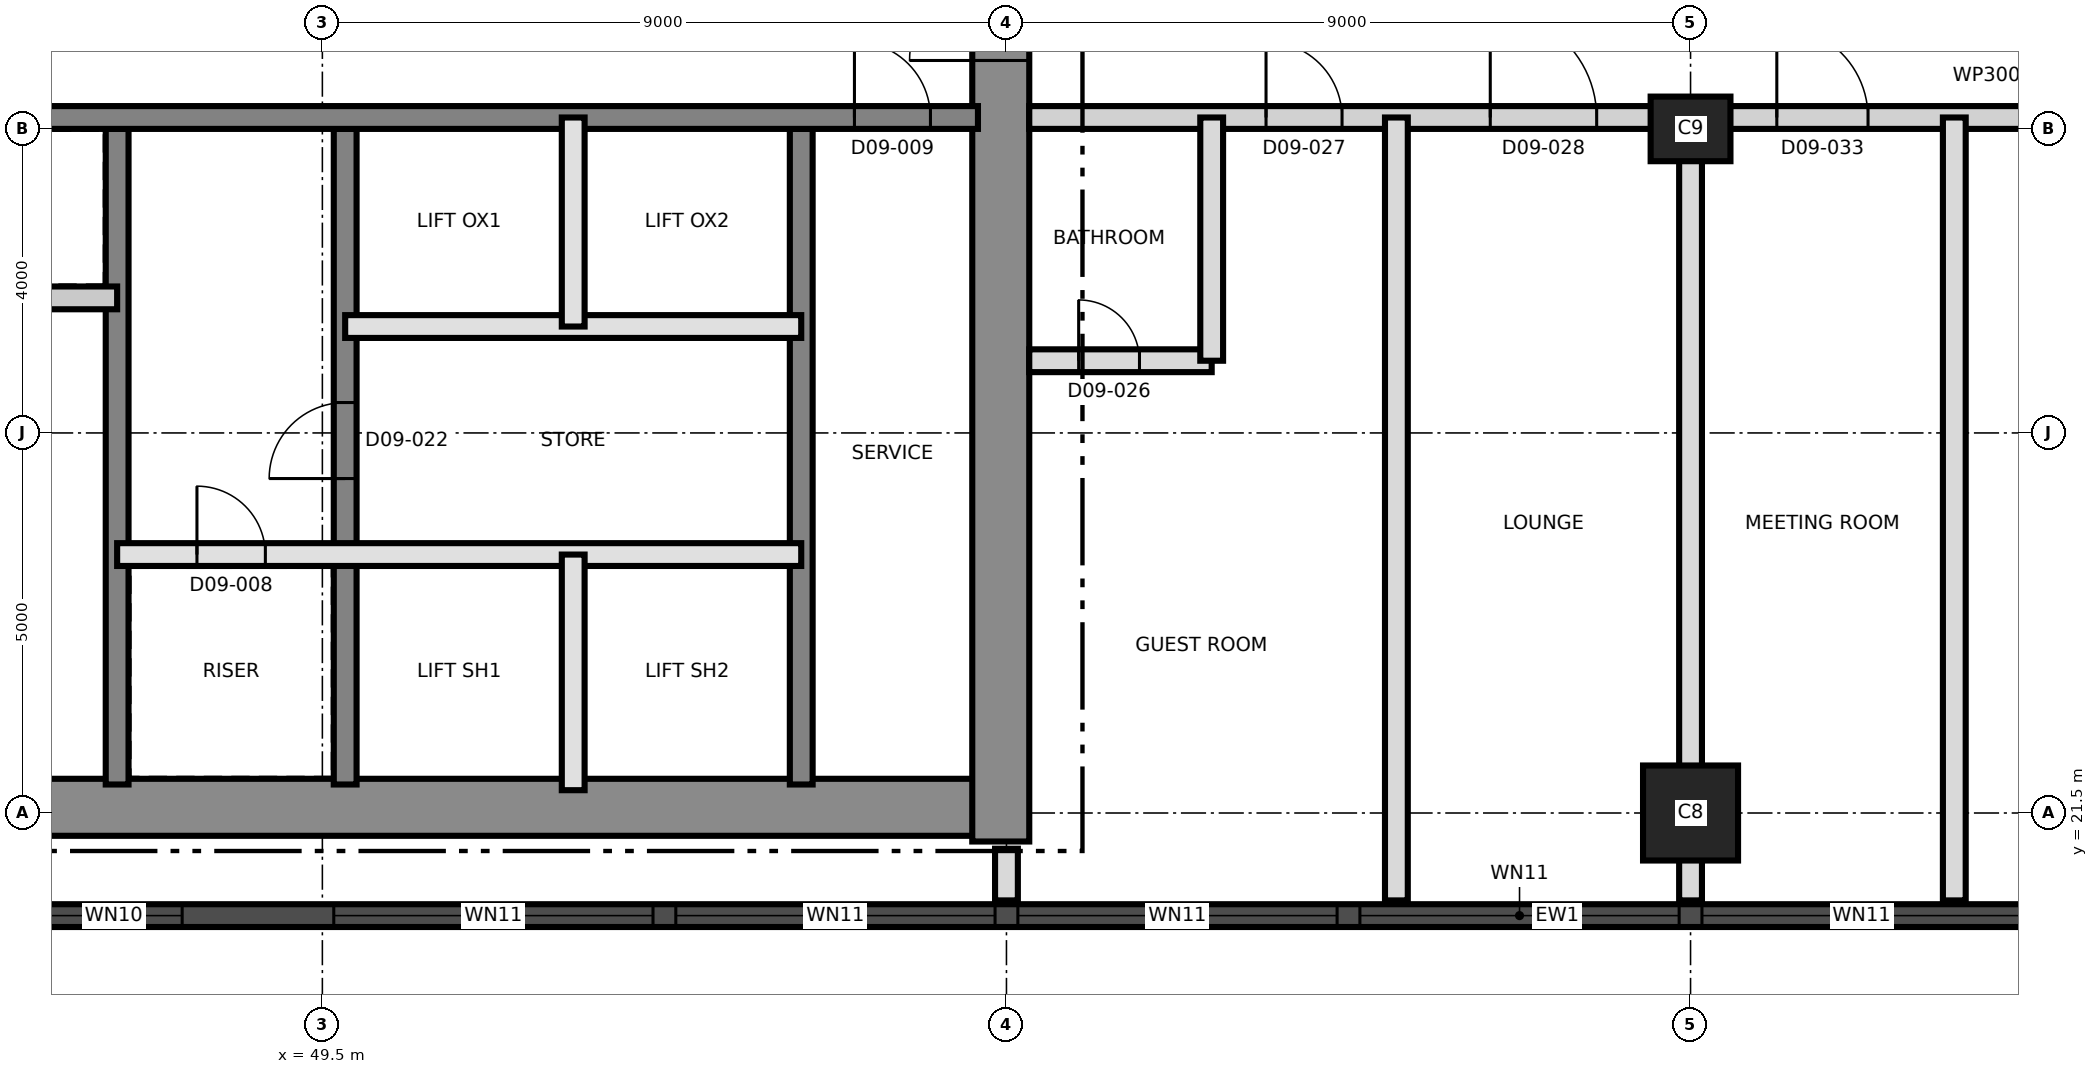
"""IFC4 building model, lengths in metres.
Left out: names, types, materials, properties, quantities, classifications, styles, units other than length and angle.
Written with IfcOpenShell. Run it as: python <this file> out.ifc"""

import sys

from ifc_helpers import new_model, si_unit, direction, frame, frame_2d, origin, origin_2d, place, context, subcontext, project, spatial, rectangle, extrude, element, fill, save


model = new_model("IFC4")
c1 = context("Model", 3, precision=1e-05, world=origin(), true_north=direction((0.0, 1.0)))
c2 = subcontext(c1, "Body", "Model", "MODEL_VIEW")
j1 = project(units=[si_unit("LENGTHUNIT", "METRE"), si_unit("PLANEANGLEUNIT", "RADIAN")], contexts=[c1])
p1 = place(None, origin())
s1 = spatial("IfcSite", under=j1, at=p1, CompositionType="ELEMENT")
p2 = place(p1, origin())
s2 = spatial("IfcBuilding", under=s1, at=p2, CompositionType="ELEMENT")
p3 = place(p2, frame((0.0, 0.0, 113.0)))
s3 = spatial("IfcBuildingStorey", under=s2, at=p3, CompositionType="ELEMENT", Elevation=113.0)
p4 = place(p3, frame((31.125, 21.575, 0.0), z_axis=(0.0, 0.0, 1.0), x_axis=(1.0, 0.0, 0.0)))
e1 = element("IfcWall", 1, at=p4, inside=s3, PredefinedType="SHEAR", context=c2, shape_type="SweptSolid", body=[
    extrude(rectangle(XDim=27.0, YDim=0.75, at=frame_2d((13.5, 0.0))), origin(), (0.0, 0.0, 1.0), 3.7),
])
p5 = place(p3, frame((58.425, 21.125, 0.0), z_axis=(0.0, 0.0, 1.0), x_axis=(0.0, 1.0, 0.0)))
e2 = element("IfcWall", 2, at=p5, inside=s3, PredefinedType="SHEAR", context=c2, shape_type="SweptSolid", body=[
    extrude(rectangle(XDim=18.75, YDim=0.75, at=frame_2d((9.375, 0.0))), origin(), (0.0, 0.0, 1.0), 3.7),
])
p6 = place(p5, frame((10.275, 0.0, 0.0)))
e3 = element("IfcOpeningElement", 3, at=p6, cuts=e2, PredefinedType="OPENING", context=c2, shape_type="SweptSolid", body=[
    extrude(rectangle(XDim=1.2, YDim=2.1, at=frame_2d((0.6, 1.05))), frame((0.0, 0.385, 0.0), z_axis=(0.0, -1.0, 0.0), x_axis=(1.0, 0.0, 0.0)), (0.0, 0.0, 1.0), 0.77),
])
p7 = place(p3, frame((46.8, 21.875, 0.0), z_axis=(0.0, 0.0, 1.0), x_axis=(0.0, 1.0, 0.0)))
e4 = element("IfcWall", 4, at=p7, inside=s3, PredefinedType="SHEAR", context=c2, shape_type="SweptSolid", body=[
    extrude(rectangle(XDim=8.625, YDim=0.3, at=frame_2d((4.312, 0.0))), origin(), (0.0, 0.0, 1.0), 3.7),
])
p8 = place(p3, frame((49.8, 21.875, 0.0), z_axis=(0.0, 0.0, 1.0), x_axis=(0.0, 1.0, 0.0)))
e5 = element("IfcWall", 5, at=p8, inside=s3, PredefinedType="SHEAR", context=c2, shape_type="SweptSolid", body=[
    extrude(rectangle(XDim=8.625, YDim=0.3, at=frame_2d((4.312, 0.0))), origin(), (0.0, 0.0, 1.0), 3.7),
])
p9 = place(p8, frame((4.025, 0.0, 0.0)))
e6 = element("IfcOpeningElement", 6, at=p9, cuts=e5, PredefinedType="OPENING", context=c2, shape_type="SweptSolid", body=[
    extrude(rectangle(XDim=1.0, YDim=2.1, at=frame_2d((0.5, 1.05))), frame((0.0, 0.16, 0.0), z_axis=(0.0, -1.0, 0.0), x_axis=(1.0, 0.0, 0.0)), (0.0, 0.0, 1.0), 0.32),
])
p10 = place(p3, frame((55.8, 21.875, 0.0), z_axis=(0.0, 0.0, 1.0), x_axis=(0.0, 1.0, 0.0)))
e7 = element("IfcWall", 7, at=p10, inside=s3, PredefinedType="SHEAR", context=c2, shape_type="SweptSolid", body=[
    extrude(rectangle(XDim=8.625, YDim=0.3, at=frame_2d((4.312, 0.0))), origin(), (0.0, 0.0, 1.0), 3.7),
])
p11 = place(p3, frame((31.875, 30.65, 0.0), z_axis=(0.0, 0.0, 1.0), x_axis=(1.0, 0.0, 0.0)))
e8 = element("IfcWall", 8, at=p11, inside=s3, PredefinedType="SHEAR", context=c2, shape_type="SweptSolid", body=[
    extrude(rectangle(XDim=26.25, YDim=0.3, at=frame_2d((13.125, 0.0))), origin(), (0.0, 0.0, 1.0), 3.7),
])
p12 = place(p11, frame((24.625, 0.0, 0.0)))
e9 = element("IfcOpeningElement", 9, at=p12, cuts=e8, PredefinedType="OPENING", context=c2, shape_type="SweptSolid", body=[
    extrude(rectangle(XDim=1.0, YDim=2.1, at=frame_2d((0.5, 1.05))), frame((0.0, 0.16, 0.0), z_axis=(0.0, -1.0, 0.0), x_axis=(1.0, 0.0, 0.0)), (0.0, 0.0, 1.0), 0.32),
])
p13 = place(p11, frame((11.425, 0.0, 0.0)))
e10 = element("IfcOpeningElement", 10, at=p13, cuts=e8, PredefinedType="OPENING", context=c2, shape_type="SweptSolid", body=[
    extrude(rectangle(XDim=1.0, YDim=2.1, at=frame_2d((0.5, 1.05))), frame((0.0, 0.16, 0.0), z_axis=(0.0, -1.0, 0.0), x_axis=(1.0, 0.0, 0.0)), (0.0, 0.0, 1.0), 0.32),
])
p14 = place(p3, frame((67.5, 21.5, 0.0), z_axis=(0.0, 0.0, 1.0), x_axis=(1.0, 0.0, 0.0)))
e11 = element("IfcColumn", 11, at=p14, inside=s3, PredefinedType="COLUMN", context=c2, shape_type="SweptSolid", body=[
    extrude(rectangle(XDim=1.25, YDim=1.25, at=origin_2d()), origin(), (0.0, 0.0, 1.0), 3.7),
])
p15 = place(p3, frame((67.5, 30.5, 0.0), z_axis=(0.0, 0.0, 1.0), x_axis=(1.0, 0.0, 0.0)))
e12 = element("IfcColumn", 12, at=p15, inside=s3, PredefinedType="COLUMN", context=c2, shape_type="SweptSolid", body=[
    extrude(rectangle(XDim=1.05, YDim=0.85, at=origin_2d()), origin(), (0.0, 0.0, 1.0), 3.7),
])
p16 = place(p3, frame((44.011, 20.15, 0.0), z_axis=(0.0, 0.0, 1.0), x_axis=(1.0, 0.0, 0.0)))
e13 = element("IfcWall", 13, at=p16, inside=s3, PredefinedType="SOLIDWALL", context=c2, shape_type="SweptSolid", body=[
    extrude(rectangle(XDim=43.476, YDim=0.3, at=frame_2d((21.738, 0.0))), origin(), (0.0, 0.0, 1.0), 3.4),
])
p17 = place(p16, frame((1.845, 0.0, 0.3)))
e14 = element("IfcOpeningElement", 14, at=p17, cuts=e13, PredefinedType="OPENING", context=c2, shape_type="SweptSolid", body=[
    extrude(rectangle(XDim=1.8, YDim=2.4, at=frame_2d((0.9, 1.2))), frame((0.0, 0.16, 0.0), z_axis=(0.0, -1.0, 0.0), x_axis=(1.0, 0.0, 0.0)), (0.0, 0.0, 1.0), 0.32),
])
p18 = place(p16, frame((5.639, 0.0, 0.9)))
e15 = element("IfcOpeningElement", 15, at=p18, cuts=e13, PredefinedType="OPENING", context=c2, shape_type="SweptSolid", body=[
    extrude(rectangle(XDim=4.2, YDim=1.5, at=frame_2d((2.1, 0.75))), frame((0.0, 0.16, 0.0), z_axis=(0.0, -1.0, 0.0), x_axis=(1.0, 0.0, 0.0)), (0.0, 0.0, 1.0), 0.32),
])
p19 = place(p16, frame((10.139, 0.0, 0.9)))
e16 = element("IfcOpeningElement", 16, at=p19, cuts=e13, PredefinedType="OPENING", context=c2, shape_type="SweptSolid", body=[
    extrude(rectangle(XDim=4.2, YDim=1.5, at=frame_2d((2.1, 0.75))), frame((0.0, 0.16, 0.0), z_axis=(0.0, -1.0, 0.0), x_axis=(1.0, 0.0, 0.0)), (0.0, 0.0, 1.0), 0.32),
])
p20 = place(p16, frame((14.639, 0.0, 0.9)))
e17 = element("IfcOpeningElement", 17, at=p20, cuts=e13, PredefinedType="OPENING", context=c2, shape_type="SweptSolid", body=[
    extrude(rectangle(XDim=4.2, YDim=1.5, at=frame_2d((2.1, 0.75))), frame((0.0, 0.16, 0.0), z_axis=(0.0, -1.0, 0.0), x_axis=(1.0, 0.0, 0.0)), (0.0, 0.0, 1.0), 0.32),
])
p21 = place(p16, frame((19.139, 0.0, 0.9)))
e18 = element("IfcOpeningElement", 18, at=p21, cuts=e13, PredefinedType="OPENING", context=c2, shape_type="SweptSolid", body=[
    extrude(rectangle(XDim=4.2, YDim=1.5, at=frame_2d((2.1, 0.75))), frame((0.0, 0.16, 0.0), z_axis=(0.0, -1.0, 0.0), x_axis=(1.0, 0.0, 0.0)), (0.0, 0.0, 1.0), 0.32),
])
p22 = place(p16, frame((23.639, 0.0, 0.9)))
e19 = element("IfcOpeningElement", 19, at=p22, cuts=e13, PredefinedType="OPENING", context=c2, shape_type="SweptSolid", body=[
    extrude(rectangle(XDim=4.2, YDim=1.5, at=frame_2d((2.1, 0.75))), frame((0.0, 0.16, 0.0), z_axis=(0.0, -1.0, 0.0), x_axis=(1.0, 0.0, 0.0)), (0.0, 0.0, 1.0), 0.32),
])
p23 = place(p16, frame((28.139, 0.0, 0.9)))
e20 = element("IfcOpeningElement", 20, at=p23, cuts=e13, PredefinedType="OPENING", context=c2, shape_type="SweptSolid", body=[
    extrude(rectangle(XDim=4.2, YDim=1.5, at=frame_2d((2.1, 0.75))), frame((0.0, 0.16, 0.0), z_axis=(0.0, -1.0, 0.0), x_axis=(1.0, 0.0, 0.0)), (0.0, 0.0, 1.0), 0.32),
])
p24 = place(p16, frame((32.639, 0.0, 0.9)))
e21 = element("IfcOpeningElement", 21, at=p24, cuts=e13, PredefinedType="OPENING", context=c2, shape_type="SweptSolid", body=[
    extrude(rectangle(XDim=4.2, YDim=1.5, at=frame_2d((2.1, 0.75))), frame((0.0, 0.16, 0.0), z_axis=(0.0, -1.0, 0.0), x_axis=(1.0, 0.0, 0.0)), (0.0, 0.0, 1.0), 0.32),
])
p25 = place(p16, frame((37.139, 0.0, 0.9)))
e22 = element("IfcOpeningElement", 22, at=p25, cuts=e13, PredefinedType="OPENING", context=c2, shape_type="SweptSolid", body=[
    extrude(rectangle(XDim=4.2, YDim=1.5, at=frame_2d((2.1, 0.75))), frame((0.0, 0.16, 0.0), z_axis=(0.0, -1.0, 0.0), x_axis=(1.0, 0.0, 0.0)), (0.0, 0.0, 1.0), 0.32),
])
p26 = place(p3, frame((46.8, 24.9, 0.0), z_axis=(0.0, 0.0, 1.0), x_axis=(1.0, 0.0, 0.0)))
e23 = element("IfcWall", 23, at=p26, inside=s3, PredefinedType="SOLIDWALL", context=c2, shape_type="SweptSolid", body=[
    extrude(rectangle(XDim=9.0, YDim=0.3, at=frame_2d((4.5, 0.0))), origin(), (0.0, 0.0, 1.0), 3.4),
])
p27 = place(p26, frame((1.05, 0.0, 0.0)))
e24 = element("IfcOpeningElement", 24, at=p27, cuts=e23, PredefinedType="OPENING", context=c2, shape_type="SweptSolid", body=[
    extrude(rectangle(XDim=0.9, YDim=2.1, at=frame_2d((0.45, 1.05))), frame((0.0, 0.16, 0.0), z_axis=(0.0, -1.0, 0.0), x_axis=(1.0, 0.0, 0.0)), (0.0, 0.0, 1.0), 0.32),
])
p28 = place(p3, frame((49.8, 27.9, 0.0), z_axis=(0.0, 0.0, 1.0), x_axis=(1.0, 0.0, 0.0)))
e25 = element("IfcWall", 25, at=p28, inside=s3, PredefinedType="SOLIDWALL", context=c2, shape_type="SweptSolid", body=[
    extrude(rectangle(XDim=6.0, YDim=0.3, at=frame_2d((3.0, 0.0))), origin(), (0.0, 0.0, 1.0), 3.4),
])
p29 = place(p3, frame((40.8, 28.277, 0.0), z_axis=(0.0, 0.0, 1.0), x_axis=(1.0, 0.0, 0.0)))
e26 = element("IfcWall", 26, at=p29, inside=s3, PredefinedType="PARTITIONING", context=c2, shape_type="SweptSolid", body=[
    extrude(rectangle(XDim=6.0, YDim=0.3, at=frame_2d((3.0, 0.0))), origin(), (0.0, 0.0, 1.0), 3.4),
])
p30 = place(p3, frame((52.8, 21.8, 0.0), z_axis=(0.0, 0.0, 1.0), x_axis=(0.0, 1.0, 0.0)))
e27 = element("IfcWall", 27, at=p30, inside=s3, PredefinedType="SOLIDWALL", context=c2, shape_type="SweptSolid", body=[
    extrude(rectangle(XDim=3.1, YDim=0.3, at=frame_2d((1.55, 0.0))), origin(), (0.0, 0.0, 1.0), 3.4),
])
p31 = place(p3, frame((52.8, 27.9, 0.0), z_axis=(0.0, 0.0, 1.0), x_axis=(0.0, 1.0, 0.0)))
e28 = element("IfcWall", 28, at=p31, inside=s3, PredefinedType="SOLIDWALL", context=c2, shape_type="SweptSolid", body=[
    extrude(rectangle(XDim=2.75, YDim=0.3, at=frame_2d((1.375, 0.0))), origin(), (0.0, 0.0, 1.0), 3.4),
])
p32 = place(p3, frame((58.8, 27.45, 0.0), z_axis=(0.0, 0.0, 1.0), x_axis=(1.0, 0.0, 0.0)))
e29 = element("IfcWall", 29, at=p32, inside=s3, PredefinedType="PARTITIONING", context=c2, shape_type="SweptSolid", body=[
    extrude(rectangle(XDim=2.4, YDim=0.3, at=frame_2d((1.2, 0.0))), origin(), (0.0, 0.0, 1.0), 3.4),
])
p33 = place(p32, frame((0.65, 0.0, 0.0)))
e30 = element("IfcOpeningElement", 30, at=p33, cuts=e29, PredefinedType="OPENING", context=c2, shape_type="SweptSolid", body=[
    extrude(rectangle(XDim=0.8, YDim=2.1, at=frame_2d((0.4, 1.05))), frame((0.0, 0.16, 0.0), z_axis=(0.0, -1.0, 0.0), x_axis=(1.0, 0.0, 0.0)), (0.0, 0.0, 1.0), 0.32),
])
p34 = place(p3, frame((58.8, 30.65, 0.0), z_axis=(0.0, 0.0, 1.0), x_axis=(1.0, 0.0, 0.0)))
e31 = element("IfcWall", 31, at=p34, inside=s3, PredefinedType="PARTITIONING", context=c2, shape_type="SweptSolid", body=[
    extrude(rectangle(XDim=26.53, YDim=0.3, at=frame_2d((13.265, 0.0))), origin(), (0.0, 0.0, 1.0), 3.4),
])
p35 = place(p34, frame((3.115, 0.0, 0.0)))
e32 = element("IfcOpeningElement", 32, at=p35, cuts=e31, PredefinedType="OPENING", context=c2, shape_type="SweptSolid", body=[
    extrude(rectangle(XDim=1.0, YDim=2.1, at=frame_2d((0.5, 1.05))), frame((0.0, 0.16, 0.0), z_axis=(0.0, -1.0, 0.0), x_axis=(1.0, 0.0, 0.0)), (0.0, 0.0, 1.0), 0.32),
])
p36 = place(p34, frame((6.065, 0.0, 0.0)))
e33 = element("IfcOpeningElement", 33, at=p36, cuts=e31, PredefinedType="OPENING", context=c2, shape_type="SweptSolid", body=[
    extrude(rectangle(XDim=1.4, YDim=2.1, at=frame_2d((0.7, 1.05))), frame((0.0, 0.16, 0.0), z_axis=(0.0, -1.0, 0.0), x_axis=(1.0, 0.0, 0.0)), (0.0, 0.0, 1.0), 0.32),
])
p37 = place(p34, frame((9.835, 0.0, 0.0)))
e34 = element("IfcOpeningElement", 34, at=p37, cuts=e31, PredefinedType="OPENING", context=c2, shape_type="SweptSolid", body=[
    extrude(rectangle(XDim=1.2, YDim=2.1, at=frame_2d((0.6, 1.05))), frame((0.0, 0.16, 0.0), z_axis=(0.0, -1.0, 0.0), x_axis=(1.0, 0.0, 0.0)), (0.0, 0.0, 1.0), 0.32),
])
p38 = place(p34, frame((13.085, 0.0, 0.0)))
e35 = element("IfcOpeningElement", 35, at=p38, cuts=e31, PredefinedType="OPENING", context=c2, shape_type="SweptSolid", body=[
    extrude(rectangle(XDim=1.0, YDim=2.1, at=frame_2d((0.5, 1.05))), frame((0.0, 0.16, 0.0), z_axis=(0.0, -1.0, 0.0), x_axis=(1.0, 0.0, 0.0)), (0.0, 0.0, 1.0), 0.32),
])
p39 = place(p34, frame((21.7, 0.0, 0.0)))
e36 = element("IfcOpeningElement", 36, at=p39, cuts=e31, PredefinedType="OPENING", context=c2, shape_type="SweptSolid", body=[
    extrude(rectangle(XDim=1.0, YDim=2.4, at=frame_2d((0.5, 1.2))), frame((0.0, 0.16, 0.0), z_axis=(0.0, -1.0, 0.0), x_axis=(1.0, 0.0, 0.0)), (0.0, 0.0, 1.0), 0.32),
])
p40 = place(p3, frame((58.5, 20.35, 0.0), z_axis=(0.0, 0.0, 1.0), x_axis=(0.0, 1.0, 0.0)))
e37 = element("IfcWall", 37, at=p40, inside=s3, PredefinedType="PARTITIONING", context=c2, shape_type="SweptSolid", body=[
    extrude(rectangle(XDim=0.68, YDim=0.3, at=frame_2d((0.34, 0.0))), origin(), (0.0, 0.0, 1.0), 3.4),
])
p41 = place(p3, frame((61.2, 27.45, 0.0), z_axis=(0.0, 0.0, 1.0), x_axis=(0.0, 1.0, 0.0)))
e38 = element("IfcWall", 38, at=p41, inside=s3, PredefinedType="PARTITIONING", context=c2, shape_type="SweptSolid", body=[
    extrude(rectangle(XDim=3.2, YDim=0.3, at=frame_2d((1.6, 0.0))), origin(), (0.0, 0.0, 1.0), 3.4),
])
for number, where, z_axis, x_axis in (
    (39, (63.63, 20.35, 0.0), (0.0, 0.0, 1.0), (0.0, 1.0, 0.0)),
    (40, (67.5, 20.35, 0.0), (0.0, 0.0, 1.0), (0.0, 1.0, 0.0)),
    (41, (70.97, 20.35, 0.0), (0.0, 0.0, 1.0), (0.0, 1.0, 0.0)),
):
    element("IfcWall", number, at=place(p3, frame(where, z_axis=z_axis, x_axis=x_axis)), inside=s3, PredefinedType="PARTITIONING", context=c2, shape_type="SweptSolid", body=[
        extrude(rectangle(XDim=10.3, YDim=0.3, at=frame_2d((5.15, 0.0))), origin(), (0.0, 0.0, 1.0), 3.4),
    ])
p42 = place(p17, origin())
e42 = element("IfcWindow", 42, at=p42, inside=s3, PartitioningType="SINGLE_PANEL", PredefinedType="WINDOW", context=c2, shape_type="SweptSolid", body=[
    extrude(rectangle(XDim=1.8, YDim=2.4, at=frame_2d((0.9, 1.2))), frame((0.0, 0.03, 0.0), z_axis=(0.0, -1.0, 0.0), x_axis=(1.0, 0.0, 0.0)), (0.0, 0.0, 1.0), 0.06),
])
fill(e14, e42)
p43 = place(p18, origin())
e43 = element("IfcWindow", 43, at=p43, inside=s3, PartitioningType="SINGLE_PANEL", PredefinedType="WINDOW", context=c2, shape_type="SweptSolid", body=[
    extrude(rectangle(XDim=4.2, YDim=1.5, at=frame_2d((2.1, 0.75))), frame((0.0, 0.03, 0.0), z_axis=(0.0, -1.0, 0.0), x_axis=(1.0, 0.0, 0.0)), (0.0, 0.0, 1.0), 0.06),
])
fill(e15, e43)
p44 = place(p19, origin())
e44 = element("IfcWindow", 44, at=p44, inside=s3, PartitioningType="SINGLE_PANEL", PredefinedType="WINDOW", context=c2, shape_type="SweptSolid", body=[
    extrude(rectangle(XDim=4.2, YDim=1.5, at=frame_2d((2.1, 0.75))), frame((0.0, 0.03, 0.0), z_axis=(0.0, -1.0, 0.0), x_axis=(1.0, 0.0, 0.0)), (0.0, 0.0, 1.0), 0.06),
])
fill(e16, e44)
p45 = place(p20, origin())
e45 = element("IfcWindow", 45, at=p45, inside=s3, PartitioningType="SINGLE_PANEL", PredefinedType="WINDOW", context=c2, shape_type="SweptSolid", body=[
    extrude(rectangle(XDim=4.2, YDim=1.5, at=frame_2d((2.1, 0.75))), frame((0.0, 0.03, 0.0), z_axis=(0.0, -1.0, 0.0), x_axis=(1.0, 0.0, 0.0)), (0.0, 0.0, 1.0), 0.06),
])
fill(e17, e45)
p46 = place(p21, origin())
e46 = element("IfcWindow", 46, at=p46, inside=s3, PartitioningType="SINGLE_PANEL", PredefinedType="WINDOW", context=c2, shape_type="SweptSolid", body=[
    extrude(rectangle(XDim=4.2, YDim=1.5, at=frame_2d((2.1, 0.75))), frame((0.0, 0.03, 0.0), z_axis=(0.0, -1.0, 0.0), x_axis=(1.0, 0.0, 0.0)), (0.0, 0.0, 1.0), 0.06),
])
fill(e18, e46)
p47 = place(p22, origin())
e47 = element("IfcWindow", 47, at=p47, inside=s3, PartitioningType="SINGLE_PANEL", PredefinedType="WINDOW", context=c2, shape_type="SweptSolid", body=[
    extrude(rectangle(XDim=4.2, YDim=1.5, at=frame_2d((2.1, 0.75))), frame((0.0, 0.03, 0.0), z_axis=(0.0, -1.0, 0.0), x_axis=(1.0, 0.0, 0.0)), (0.0, 0.0, 1.0), 0.06),
])
fill(e19, e47)
p48 = place(p27, origin())
e48 = element("IfcDoor", 48, at=p48, inside=s3, OperationType="SINGLE_SWING_RIGHT", PredefinedType="DOOR", context=c2, shape_type="SweptSolid", body=[
    extrude(rectangle(XDim=0.9, YDim=2.1, at=frame_2d((0.45, 1.05))), frame((0.0, 0.025, 0.0), z_axis=(0.0, -1.0, 0.0), x_axis=(1.0, 0.0, 0.0)), (0.0, 0.0, 1.0), 0.05),
])
fill(e24, e48)
p49 = place(p12, origin())
e49 = element("IfcDoor", 49, at=p49, inside=s3, OperationType="SINGLE_SWING_LEFT", PredefinedType="DOOR", context=c2, shape_type="SweptSolid", body=[
    extrude(rectangle(XDim=1.0, YDim=2.1, at=frame_2d((0.5, 1.05))), frame((0.0, 0.025, 0.0), z_axis=(0.0, -1.0, 0.0), x_axis=(1.0, 0.0, 0.0)), (0.0, 0.0, 1.0), 0.05),
])
fill(e9, e49)
p50 = place(p6, origin())
e50 = element("IfcDoor", 50, at=p50, inside=s3, OperationType="SINGLE_SWING_LEFT", PredefinedType="DOOR", context=c2, shape_type="SweptSolid", body=[
    extrude(rectangle(XDim=1.2, YDim=2.1, at=frame_2d((0.6, 1.05))), frame((0.0, 0.025, 0.0), z_axis=(0.0, -1.0, 0.0), x_axis=(1.0, 0.0, 0.0)), (0.0, 0.0, 1.0), 0.05),
])
fill(e3, e50)
p51 = place(p9, origin())
e51 = element("IfcDoor", 51, at=p51, inside=s3, OperationType="SINGLE_SWING_LEFT", PredefinedType="DOOR", context=c2, shape_type="SweptSolid", body=[
    extrude(rectangle(XDim=1.0, YDim=2.1, at=frame_2d((0.5, 1.05))), frame((0.0, 0.025, 0.0), z_axis=(0.0, -1.0, 0.0), x_axis=(1.0, 0.0, 0.0)), (0.0, 0.0, 1.0), 0.05),
])
fill(e6, e51)
p52 = place(p33, origin())
e52 = element("IfcDoor", 52, at=p52, inside=s3, OperationType="SINGLE_SWING_LEFT", PredefinedType="DOOR", context=c2, shape_type="SweptSolid", body=[
    extrude(rectangle(XDim=0.8, YDim=2.1, at=frame_2d((0.4, 1.05))), frame((0.0, 0.025, 0.0), z_axis=(0.0, -1.0, 0.0), x_axis=(1.0, 0.0, 0.0)), (0.0, 0.0, 1.0), 0.05),
])
fill(e30, e52)
p53 = place(p35, origin())
e53 = element("IfcDoor", 53, at=p53, inside=s3, OperationType="SINGLE_SWING_RIGHT", PredefinedType="DOOR", context=c2, shape_type="SweptSolid", body=[
    extrude(rectangle(XDim=1.0, YDim=2.1, at=frame_2d((0.5, 1.05))), frame((0.0, 0.025, 0.0), z_axis=(0.0, -1.0, 0.0), x_axis=(1.0, 0.0, 0.0)), (0.0, 0.0, 1.0), 0.05),
])
fill(e32, e53)
p54 = place(p36, origin())
e54 = element("IfcDoor", 54, at=p54, inside=s3, OperationType="SINGLE_SWING_LEFT", PredefinedType="DOOR", context=c2, shape_type="SweptSolid", body=[
    extrude(rectangle(XDim=1.4, YDim=2.1, at=frame_2d((0.7, 1.05))), frame((0.0, 0.025, 0.0), z_axis=(0.0, -1.0, 0.0), x_axis=(1.0, 0.0, 0.0)), (0.0, 0.0, 1.0), 0.05),
])
fill(e33, e54)
p55 = place(p37, origin())
e55 = element("IfcDoor", 55, at=p55, inside=s3, OperationType="SINGLE_SWING_LEFT", PredefinedType="DOOR", context=c2, shape_type="SweptSolid", body=[
    extrude(rectangle(XDim=1.2, YDim=2.1, at=frame_2d((0.6, 1.05))), frame((0.0, 0.025, 0.0), z_axis=(0.0, -1.0, 0.0), x_axis=(1.0, 0.0, 0.0)), (0.0, 0.0, 1.0), 0.05),
])
fill(e34, e55)
save(model, sys.argv[1])
